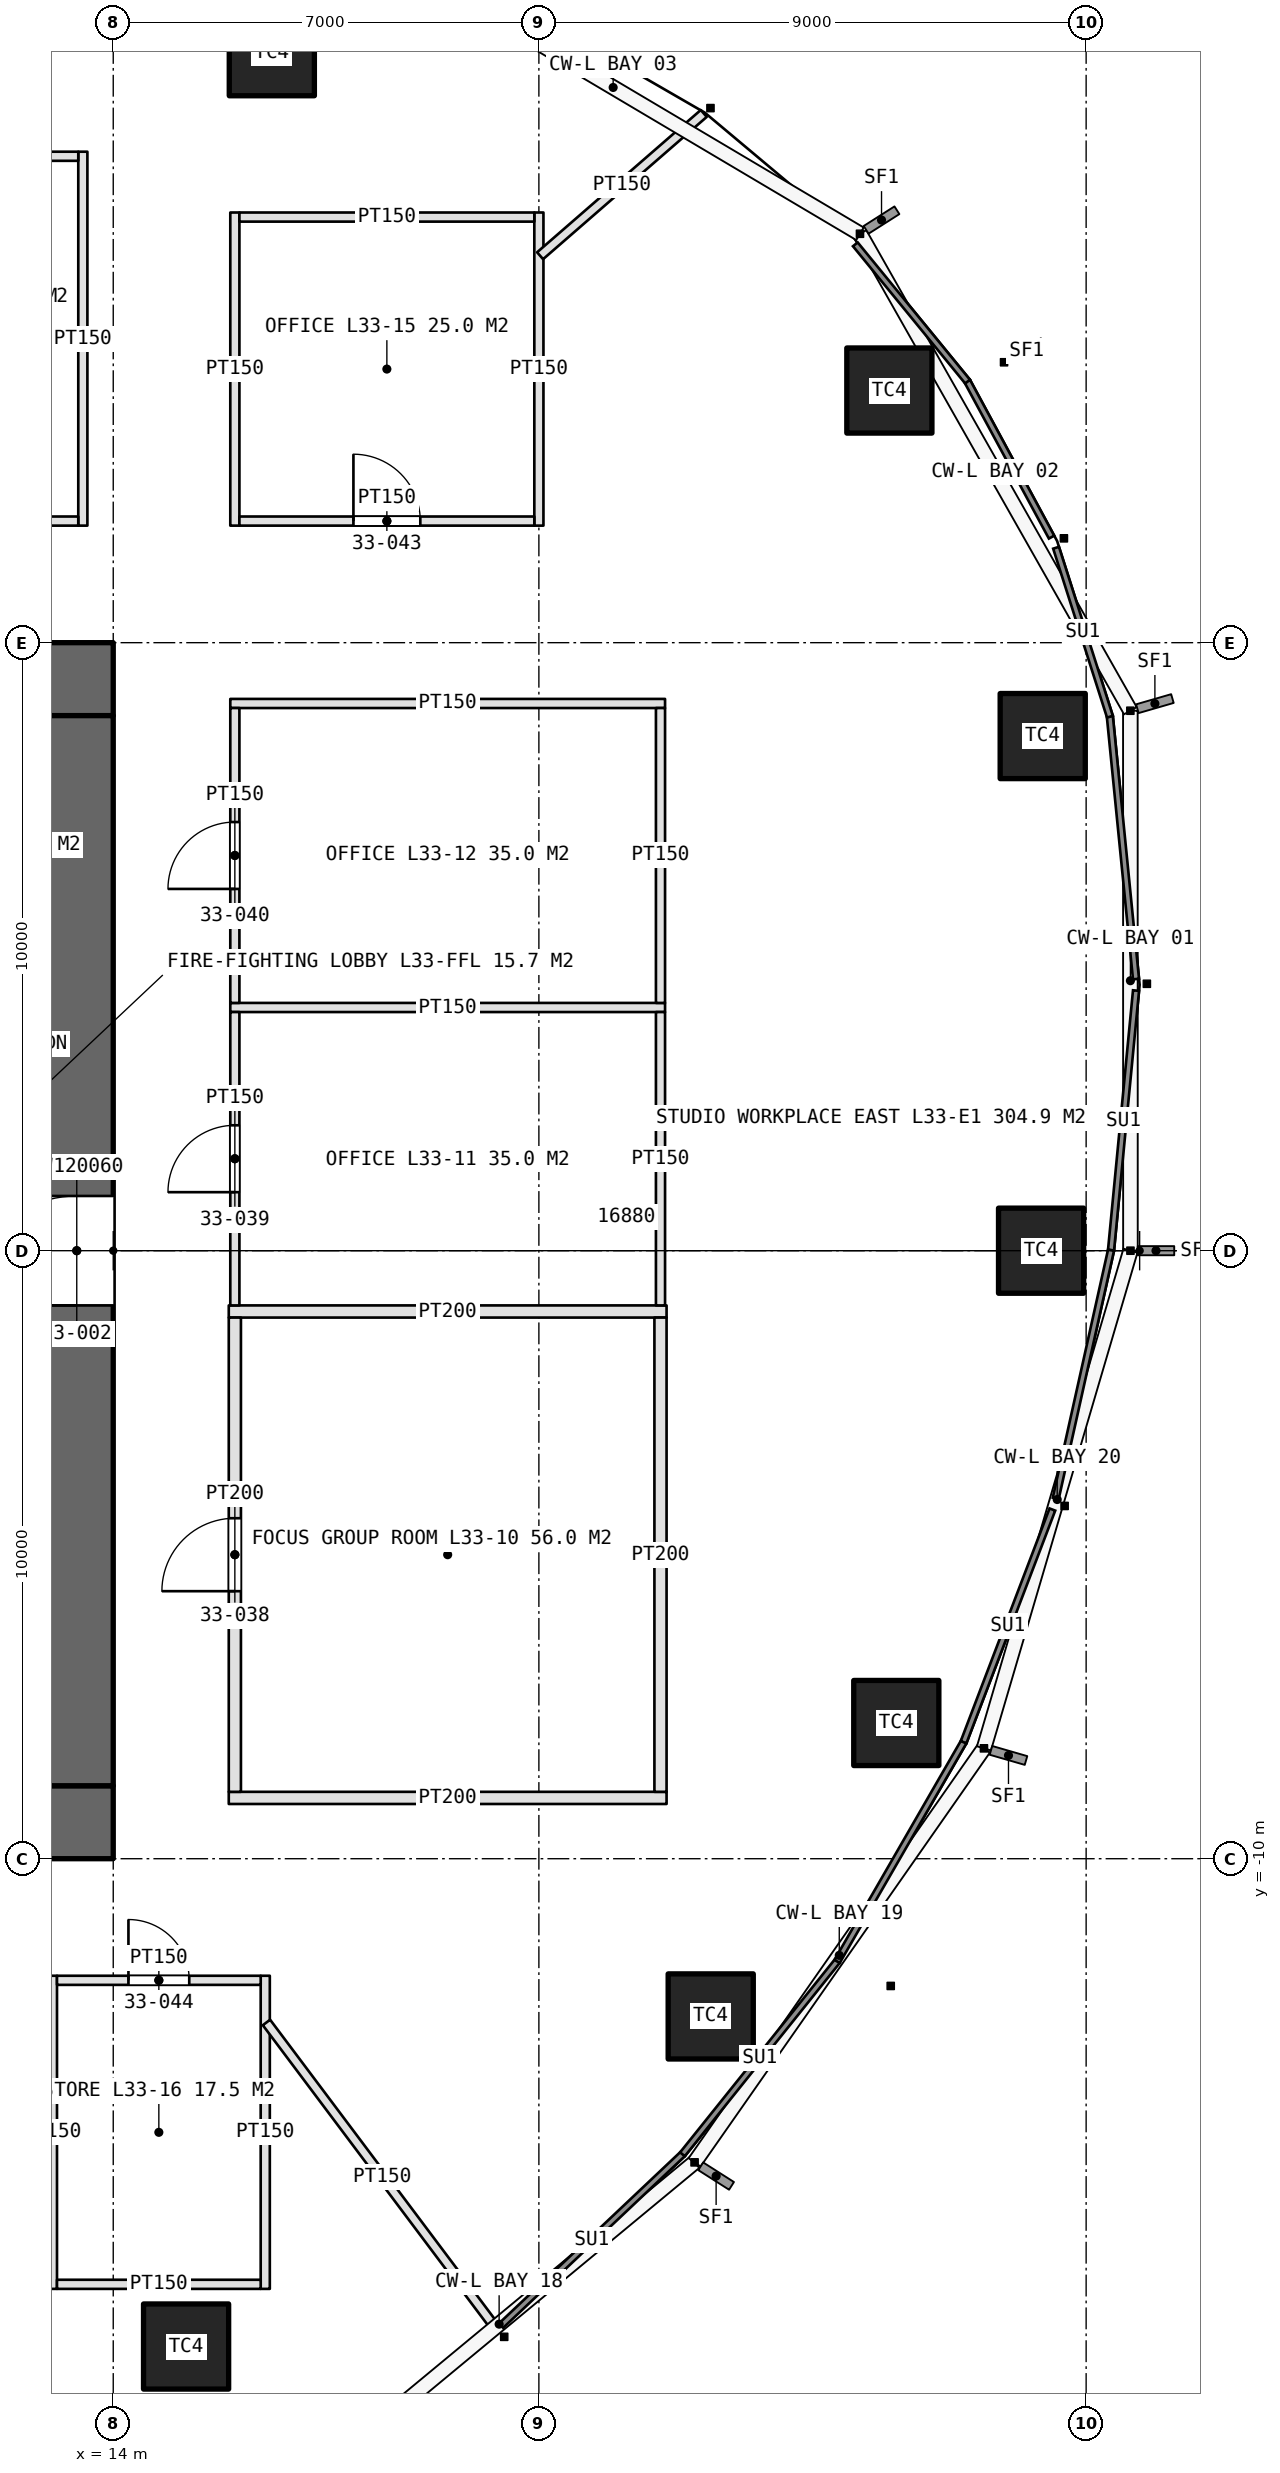
"""IFC4 building model, lengths in metres.
Left out: names, types, materials, properties, quantities, classifications, styles, units other than length and angle.
Written with IfcOpenShell. Run it as: python <this file> out.ifc"""

import sys

from ifc_helpers import new_model, si_unit, direction, frame, frame_2d, origin, origin_2d, place, context, subcontext, project, spatial, rectangle, extrude, element, fill, save


model = new_model("IFC4")
c1 = context("Model", 3, precision=1e-05, world=origin(), true_north=direction((0.0, 1.0)))
c2 = subcontext(c1, "Body", "Model", "MODEL_VIEW")
j1 = project(units=[si_unit("LENGTHUNIT", "METRE"), si_unit("PLANEANGLEUNIT", "RADIAN")], contexts=[c1])
p1 = place(None, origin())
s1 = spatial("IfcSite", under=j1, at=p1, CompositionType="ELEMENT")
p2 = place(p1, origin())
s2 = spatial("IfcBuilding", under=s1, at=p2, CompositionType="ELEMENT")
p3 = place(p2, frame((0.0, 0.0, 155.4)))
s3 = spatial("IfcBuildingStorey", under=s2, at=p3, CompositionType="ELEMENT", Elevation=155.4)
p4 = place(p3, frame((-14.0, -9.4, 0.0), z_axis=(0.0, 0.0, 1.0), x_axis=(1.0, 0.0, 0.0)))
e1 = element("IfcWall", 1, at=p4, inside=s3, PredefinedType="SHEAR", context=c2, shape_type="SweptSolid", body=[
    extrude(rectangle(XDim=28.0, YDim=1.2, at=frame_2d((14.0, 0.0))), origin(), (0.0, 0.0, 1.0), 4.2),
])
p5 = place(p4, frame((13.1, 0.0, 0.0)))
e2 = element("IfcOpeningElement", 2, at=p5, cuts=e1, PredefinedType="OPENING", context=c2, shape_type="SweptSolid", body=[
    extrude(rectangle(XDim=1.8, YDim=2.4, at=frame_2d((0.9, 1.2))), frame((0.0, 0.61, 0.0), z_axis=(0.0, -1.0, 0.0), x_axis=(1.0, 0.0, 0.0)), (0.0, 0.0, 1.0), 1.22),
])
p6 = place(p4, frame((22.9, 0.0, 0.0)))
e3 = element("IfcOpeningElement", 3, at=p6, cuts=e1, PredefinedType="OPENING", context=c2, shape_type="SweptSolid", body=[
    extrude(rectangle(XDim=2.2, YDim=2.7, at=frame_2d((1.1, 1.35))), frame((0.0, 0.61, 0.0), z_axis=(0.0, -1.0, 0.0), x_axis=(1.0, 0.0, 0.0)), (0.0, 0.0, 1.0), 1.22),
])
p7 = place(p3, frame((14.0, 9.4, 0.0), z_axis=(0.0, 0.0, 1.0), x_axis=(-1.0, 0.0, 0.0)))
e4 = element("IfcWall", 4, at=p7, inside=s3, PredefinedType="SHEAR", context=c2, shape_type="SweptSolid", body=[
    extrude(rectangle(XDim=28.0, YDim=1.2, at=frame_2d((14.0, 0.0))), origin(), (0.0, 0.0, 1.0), 4.2),
])
p8 = place(p7, frame((24.0, 0.0, 0.0)))
e5 = element("IfcOpeningElement", 5, at=p8, cuts=e4, PredefinedType="OPENING", context=c2, shape_type="SweptSolid", body=[
    extrude(rectangle(XDim=1.0, YDim=2.4, at=frame_2d((0.5, 1.2))), frame((0.0, 0.61, 0.0), z_axis=(0.0, -1.0, 0.0), x_axis=(1.0, 0.0, 0.0)), (0.0, 0.0, 1.0), 1.22),
])
p9 = place(p7, frame((13.1, 0.0, 0.0)))
e6 = element("IfcOpeningElement", 6, at=p9, cuts=e4, PredefinedType="OPENING", context=c2, shape_type="SweptSolid", body=[
    extrude(rectangle(XDim=1.8, YDim=2.4, at=frame_2d((0.9, 1.2))), frame((0.0, 0.61, 0.0), z_axis=(0.0, -1.0, 0.0), x_axis=(1.0, 0.0, 0.0)), (0.0, 0.0, 1.0), 1.22),
])
p10 = place(p3, frame((13.4, -8.8, 0.0), z_axis=(0.0, 0.0, 1.0), x_axis=(0.0, 1.0, 0.0)))
e7 = element("IfcWall", 7, at=p10, inside=s3, PredefinedType="SHEAR", context=c2, shape_type="SweptSolid", body=[
    extrude(rectangle(XDim=17.6, YDim=1.2, at=frame_2d((8.8, 0.0))), origin(), (0.0, 0.0, 1.0), 4.2),
])
p11 = place(p10, frame((7.9, 0.0, 0.0)))
e8 = element("IfcOpeningElement", 8, at=p11, cuts=e7, PredefinedType="OPENING", context=c2, shape_type="SweptSolid", body=[
    extrude(rectangle(XDim=1.8, YDim=2.4, at=frame_2d((0.9, 1.2))), frame((0.0, 0.61, 0.0), z_axis=(0.0, -1.0, 0.0), x_axis=(1.0, 0.0, 0.0)), (0.0, 0.0, 1.0), 1.22),
])
for number, where, z_axis, x_axis in (
    (9, (29.259, 0.0, 0.0), (0.0, 0.0, 1.0), (1.0, 0.0, 0.0)),
    (10, (29.286, 8.464, 0.0), (0.0, 0.0, 1.0), (1.0, 0.0, 0.0)),
    (11, (26.764, 14.147, 0.0), (0.0, 0.0, 1.0), (1.0, 0.0, 0.0)),
    (12, (16.608, 19.695, 0.0), (0.0, 0.0, 1.0), (1.0, 0.0, 0.0)),
    (13, (15.198, -18.023, 0.0), (0.0, 0.0, 1.0), (1.0, 0.0, 0.0)),
    (14, (23.826, -12.594, 0.0), (0.0, 0.0, 1.0), (1.0, 0.0, 0.0)),
    (15, (26.878, -7.768, 0.0), (0.0, 0.0, 1.0), (1.0, 0.0, 0.0)),
):
    element("IfcColumn", number, at=place(p3, frame(where, z_axis=z_axis, x_axis=x_axis)), inside=s3, PredefinedType="COLUMN", context=c2, shape_type="SweptSolid", body=[
        extrude(rectangle(XDim=1.4, YDim=1.4, at=origin_2d()), origin(), (0.0, 0.0, 1.0), 4.2),
    ])
p12 = place(p3, frame((13.5, 11.925, 0.0), z_axis=(0.0, 0.0, 1.0), x_axis=(0.0, 1.0, 0.0)))
e16 = element("IfcWall", 16, at=p12, inside=s3, PredefinedType="PARTITIONING", context=c2, shape_type="SweptSolid", body=[
    extrude(rectangle(XDim=6.15, YDim=0.15, at=frame_2d((3.075, 0.0))), origin(), (0.0, 0.0, 1.0), 3.0),
])
p13 = place(p3, frame((9.1, 12.0, 0.0), z_axis=(0.0, 0.0, 1.0), x_axis=(1.0, 0.0, 0.0)))
e17 = element("IfcWall", 17, at=p13, inside=s3, PredefinedType="PARTITIONING", context=c2, shape_type="SweptSolid", body=[
    extrude(rectangle(XDim=4.325, YDim=0.15, at=frame_2d((2.163, 0.0))), origin(), (0.0, 0.0, 1.0), 3.0),
])
p14 = place(p13, frame((1.663, 0.0, 0.0)))
e18 = element("IfcOpeningElement", 18, at=p14, cuts=e17, PredefinedType="OPENING", context=c2, shape_type="SweptSolid", body=[
    extrude(rectangle(XDim=1.0, YDim=2.2, at=frame_2d((0.5, 1.1))), frame((0.0, 0.085, 0.0), z_axis=(0.0, -1.0, 0.0), x_axis=(1.0, 0.0, 0.0)), (0.0, 0.0, 1.0), 0.17),
])
p15 = place(p3, frame((9.1, 18.0, 0.0), z_axis=(0.0, 0.0, 1.0), x_axis=(1.0, 0.0, 0.0)))
e19 = element("IfcWall", 19, at=p15, inside=s3, PredefinedType="PARTITIONING", context=c2, shape_type="SweptSolid", body=[
    extrude(rectangle(XDim=4.325, YDim=0.15, at=frame_2d((2.163, 0.0))), origin(), (0.0, 0.0, 1.0), 3.0),
])
for number, where, z_axis, x_axis in (
    (20, (15.9, -9.0, 0.0), (0.0, 0.0, 1.0), (1.0, 0.0, 0.0)),
    (21, (15.9, -1.0, 0.0), (0.0, 0.0, 1.0), (1.0, 0.0, 0.0)),
):
    element("IfcWall", number, at=place(p3, frame(where, z_axis=z_axis, x_axis=x_axis)), inside=s3, PredefinedType="PARTITIONING", context=c2, shape_type="SweptSolid", body=[
        extrude(rectangle(XDim=7.2, YDim=0.2, at=frame_2d((3.6, 0.0))), origin(), (0.0, 0.0, 1.0), 3.0),
    ])
for number, where, z_axis, x_axis in (
    (22, (15.925, 4.0, 0.0), (0.0, 0.0, 1.0), (1.0, 0.0, 0.0)),
    (23, (15.925, 9.0, 0.0), (0.0, 0.0, 1.0), (1.0, 0.0, 0.0)),
):
    element("IfcWall", number, at=place(p3, frame(where, z_axis=z_axis, x_axis=x_axis)), inside=s3, PredefinedType="PARTITIONING", context=c2, shape_type="SweptSolid", body=[
        extrude(rectangle(XDim=7.15, YDim=0.15, at=frame_2d((3.575, 0.0))), origin(), (0.0, 0.0, 1.0), 3.0),
    ])
p16 = place(p3, frame((16.0, -8.9, 0.0), z_axis=(0.0, 0.0, 1.0), x_axis=(0.0, 1.0, 0.0)))
e24 = element("IfcWall", 24, at=p16, inside=s3, PredefinedType="PARTITIONING", context=c2, shape_type="SweptSolid", body=[
    extrude(rectangle(XDim=7.8, YDim=0.2, at=frame_2d((3.9, 0.0))), origin(), (0.0, 0.0, 1.0), 3.0),
])
p17 = place(p16, frame((3.3, 0.0, 0.0)))
e25 = element("IfcOpeningElement", 25, at=p17, cuts=e24, PredefinedType="OPENING", context=c2, shape_type="SweptSolid", body=[
    extrude(rectangle(XDim=1.2, YDim=2.4, at=frame_2d((0.6, 1.2))), frame((0.0, 0.11, 0.0), z_axis=(0.0, -1.0, 0.0), x_axis=(1.0, 0.0, 0.0)), (0.0, 0.0, 1.0), 0.22),
])
p18 = place(p3, frame((23.0, -8.9, 0.0), z_axis=(0.0, 0.0, 1.0), x_axis=(0.0, 1.0, 0.0)))
e26 = element("IfcWall", 26, at=p18, inside=s3, PredefinedType="PARTITIONING", context=c2, shape_type="SweptSolid", body=[
    extrude(rectangle(XDim=7.8, YDim=0.2, at=frame_2d((3.9, 0.0))), origin(), (0.0, 0.0, 1.0), 3.0),
])
p19 = place(p3, frame((16.0, -0.9, 0.0), z_axis=(0.0, 0.0, 1.0), x_axis=(0.0, 1.0, 0.0)))
e27 = element("IfcWall", 27, at=p19, inside=s3, PredefinedType="PARTITIONING", context=c2, shape_type="SweptSolid", body=[
    extrude(rectangle(XDim=4.825, YDim=0.15, at=frame_2d((2.413, 0.0))), origin(), (0.0, 0.0, 1.0), 3.0),
])
p20 = place(p19, frame((1.863, 0.0, 0.0)))
e28 = element("IfcOpeningElement", 28, at=p20, cuts=e27, PredefinedType="OPENING", context=c2, shape_type="SweptSolid", body=[
    extrude(rectangle(XDim=1.1, YDim=2.3, at=frame_2d((0.55, 1.15))), frame((0.0, 0.085, 0.0), z_axis=(0.0, -1.0, 0.0), x_axis=(1.0, 0.0, 0.0)), (0.0, 0.0, 1.0), 0.17),
])
p21 = place(p3, frame((23.0, -0.9, 0.0), z_axis=(0.0, 0.0, 1.0), x_axis=(0.0, 1.0, 0.0)))
e29 = element("IfcWall", 29, at=p21, inside=s3, PredefinedType="PARTITIONING", context=c2, shape_type="SweptSolid", body=[
    extrude(rectangle(XDim=4.825, YDim=0.15, at=frame_2d((2.413, 0.0))), origin(), (0.0, 0.0, 1.0), 3.0),
])
p22 = place(p3, frame((16.0, 4.075, 0.0), z_axis=(0.0, 0.0, 1.0), x_axis=(0.0, 1.0, 0.0)))
e30 = element("IfcWall", 30, at=p22, inside=s3, PredefinedType="PARTITIONING", context=c2, shape_type="SweptSolid", body=[
    extrude(rectangle(XDim=4.85, YDim=0.15, at=frame_2d((2.425, 0.0))), origin(), (0.0, 0.0, 1.0), 3.0),
])
p23 = place(p22, frame((1.875, 0.0, 0.0)))
e31 = element("IfcOpeningElement", 31, at=p23, cuts=e30, PredefinedType="OPENING", context=c2, shape_type="SweptSolid", body=[
    extrude(rectangle(XDim=1.1, YDim=2.3, at=frame_2d((0.55, 1.15))), frame((0.0, 0.085, 0.0), z_axis=(0.0, -1.0, 0.0), x_axis=(1.0, 0.0, 0.0)), (0.0, 0.0, 1.0), 0.17),
])
p24 = place(p3, frame((23.0, 4.075, 0.0), z_axis=(0.0, 0.0, 1.0), x_axis=(0.0, 1.0, 0.0)))
e32 = element("IfcWall", 32, at=p24, inside=s3, PredefinedType="PARTITIONING", context=c2, shape_type="SweptSolid", body=[
    extrude(rectangle(XDim=4.85, YDim=0.15, at=frame_2d((2.425, 0.0))), origin(), (0.0, 0.0, 1.0), 3.0),
])
for number, where, z_axis, x_axis in (
    (33, (16.0, 11.925, 0.0), (0.0, 0.0, 1.0), (0.0, 1.0, 0.0)),
    (34, (21.0, 11.925, 0.0), (0.0, 0.0, 1.0), (0.0, 1.0, 0.0)),
):
    element("IfcWall", number, at=place(p3, frame(where, z_axis=z_axis, x_axis=x_axis)), inside=s3, PredefinedType="PARTITIONING", context=c2, shape_type="SweptSolid", body=[
        extrude(rectangle(XDim=5.15, YDim=0.15, at=frame_2d((2.575, 0.0))), origin(), (0.0, 0.0, 1.0), 3.0),
    ])
p25 = place(p3, frame((16.075, 12.0, 0.0), z_axis=(0.0, 0.0, 1.0), x_axis=(1.0, 0.0, 0.0)))
e35 = element("IfcWall", 35, at=p25, inside=s3, PredefinedType="PARTITIONING", context=c2, shape_type="SweptSolid", body=[
    extrude(rectangle(XDim=4.85, YDim=0.15, at=frame_2d((2.425, 0.0))), origin(), (0.0, 0.0, 1.0), 3.0),
])
p26 = place(p25, frame((1.875, 0.0, 0.0)))
e36 = element("IfcOpeningElement", 36, at=p26, cuts=e35, PredefinedType="OPENING", context=c2, shape_type="SweptSolid", body=[
    extrude(rectangle(XDim=1.1, YDim=2.3, at=frame_2d((0.55, 1.15))), frame((0.0, 0.085, 0.0), z_axis=(0.0, -1.0, 0.0), x_axis=(1.0, 0.0, 0.0)), (0.0, 0.0, 1.0), 0.17),
])
p27 = place(p3, frame((16.075, 17.0, 0.0), z_axis=(0.0, 0.0, 1.0), x_axis=(1.0, 0.0, 0.0)))
e37 = element("IfcWall", 37, at=p27, inside=s3, PredefinedType="PARTITIONING", context=c2, shape_type="SweptSolid", body=[
    extrude(rectangle(XDim=4.85, YDim=0.15, at=frame_2d((2.425, 0.0))), origin(), (0.0, 0.0, 1.0), 3.0),
])
for number, where, z_axis, x_axis in (
    (38, (13.0, -11.925, 0.0), (0.0, 0.0, 1.0), (0.0, -1.0, 0.0)),
    (39, (16.5, -11.925, 0.0), (0.0, 0.0, 1.0), (0.0, -1.0, 0.0)),
):
    element("IfcWall", number, at=place(p3, frame(where, z_axis=z_axis, x_axis=x_axis)), inside=s3, PredefinedType="PARTITIONING", context=c2, shape_type="SweptSolid", body=[
        extrude(rectangle(XDim=5.15, YDim=0.15, at=frame_2d((2.575, 0.0))), origin(), (0.0, 0.0, 1.0), 3.0),
    ])
p28 = place(p3, frame((13.075, -12.0, 0.0), z_axis=(0.0, 0.0, 1.0), x_axis=(1.0, 0.0, 0.0)))
e40 = element("IfcWall", 40, at=p28, inside=s3, PredefinedType="PARTITIONING", context=c2, shape_type="SweptSolid", body=[
    extrude(rectangle(XDim=3.35, YDim=0.15, at=frame_2d((1.675, 0.0))), origin(), (0.0, 0.0, 1.0), 3.0),
])
p29 = place(p28, frame((1.175, 0.0, 0.0)))
e41 = element("IfcOpeningElement", 41, at=p29, cuts=e40, PredefinedType="OPENING", context=c2, shape_type="SweptSolid", body=[
    extrude(rectangle(XDim=1.0, YDim=2.2, at=frame_2d((0.5, 1.1))), frame((0.0, 0.085, 0.0), z_axis=(0.0, -1.0, 0.0), x_axis=(1.0, 0.0, 0.0)), (0.0, 0.0, 1.0), 0.17),
])
p30 = place(p3, frame((13.075, -17.0, 0.0), z_axis=(0.0, 0.0, 1.0), x_axis=(1.0, 0.0, 0.0)))
e42 = element("IfcWall", 42, at=p30, inside=s3, PredefinedType="PARTITIONING", context=c2, shape_type="SweptSolid", body=[
    extrude(rectangle(XDim=3.35, YDim=0.15, at=frame_2d((1.675, 0.0))), origin(), (0.0, 0.0, 1.0), 3.0),
])
p31 = place(p3, frame((16.52, -12.693, 0.0), z_axis=(0.0, 0.0, 1.0), x_axis=(0.600036938918, -0.799972294479, 0.0)))
e43 = element("IfcWall", 43, at=p31, inside=s3, PredefinedType="PARTITIONING", context=c2, shape_type="SweptSolid", body=[
    extrude(rectangle(XDim=6.345, YDim=0.15, at=frame_2d((3.172, 0.0))), origin(), (0.0, 0.0, 1.0), 3.0),
])
p32 = place(p3, frame((21.02, 16.364, 0.0), z_axis=(0.0, 0.0, 1.0), x_axis=(0.75467183248, 0.656102450278, 0.0)))
e44 = element("IfcWall", 44, at=p32, inside=s3, PredefinedType="PARTITIONING", context=c2, shape_type="SweptSolid", body=[
    extrude(rectangle(XDim=3.567, YDim=0.15, at=frame_2d((1.783, 0.0))), origin(), (0.0, 0.0, 1.0), 3.0),
])
p33 = place(p11, origin())
e45 = element("IfcDoor", 45, at=p33, inside=s3, OperationType="DOUBLE_DOOR_SINGLE_SWING", PredefinedType="DOOR", context=c2, shape_type="SweptSolid", body=[
    extrude(rectangle(XDim=1.8, YDim=2.4, at=frame_2d((0.9, 1.2))), frame((0.0, 0.025, 0.0), z_axis=(0.0, -1.0, 0.0), x_axis=(1.0, 0.0, 0.0)), (0.0, 0.0, 1.0), 0.05),
])
fill(e8, e45)
p34 = place(p17, origin())
e46 = element("IfcDoor", 46, at=p34, inside=s3, OperationType="SINGLE_SWING_LEFT", PredefinedType="DOOR", context=c2, shape_type="SweptSolid", body=[
    extrude(rectangle(XDim=1.2, YDim=2.4, at=frame_2d((0.6, 1.2))), frame((0.0, 0.025, 0.0), z_axis=(0.0, -1.0, 0.0), x_axis=(1.0, 0.0, 0.0)), (0.0, 0.0, 1.0), 0.05),
])
fill(e25, e46)
p35 = place(p20, origin())
e47 = element("IfcDoor", 47, at=p35, inside=s3, OperationType="SINGLE_SWING_LEFT", PredefinedType="DOOR", context=c2, shape_type="SweptSolid", body=[
    extrude(rectangle(XDim=1.1, YDim=2.3, at=frame_2d((0.55, 1.15))), frame((0.0, 0.025, 0.0), z_axis=(0.0, -1.0, 0.0), x_axis=(1.0, 0.0, 0.0)), (0.0, 0.0, 1.0), 0.05),
])
fill(e28, e47)
p36 = place(p23, origin())
e48 = element("IfcDoor", 48, at=p36, inside=s3, OperationType="SINGLE_SWING_LEFT", PredefinedType="DOOR", context=c2, shape_type="SweptSolid", body=[
    extrude(rectangle(XDim=1.1, YDim=2.3, at=frame_2d((0.55, 1.15))), frame((0.0, 0.025, 0.0), z_axis=(0.0, -1.0, 0.0), x_axis=(1.0, 0.0, 0.0)), (0.0, 0.0, 1.0), 0.05),
])
fill(e31, e48)
p37 = place(p26, origin())
e49 = element("IfcDoor", 49, at=p37, inside=s3, OperationType="SINGLE_SWING_LEFT", PredefinedType="DOOR", context=c2, shape_type="SweptSolid", body=[
    extrude(rectangle(XDim=1.1, YDim=2.3, at=frame_2d((0.55, 1.15))), frame((0.0, 0.025, 0.0), z_axis=(0.0, -1.0, 0.0), x_axis=(1.0, 0.0, 0.0)), (0.0, 0.0, 1.0), 0.05),
])
fill(e36, e49)
p38 = place(p29, origin())
e50 = element("IfcDoor", 50, at=p38, inside=s3, OperationType="SINGLE_SWING_LEFT", PredefinedType="DOOR", context=c2, shape_type="SweptSolid", body=[
    extrude(rectangle(XDim=1.0, YDim=2.2, at=frame_2d((0.5, 1.1))), frame((0.0, 0.025, 0.0), z_axis=(0.0, -1.0, 0.0), x_axis=(1.0, 0.0, 0.0)), (0.0, 0.0, 1.0), 0.05),
])
fill(e41, e50)
save(model, sys.argv[1])
